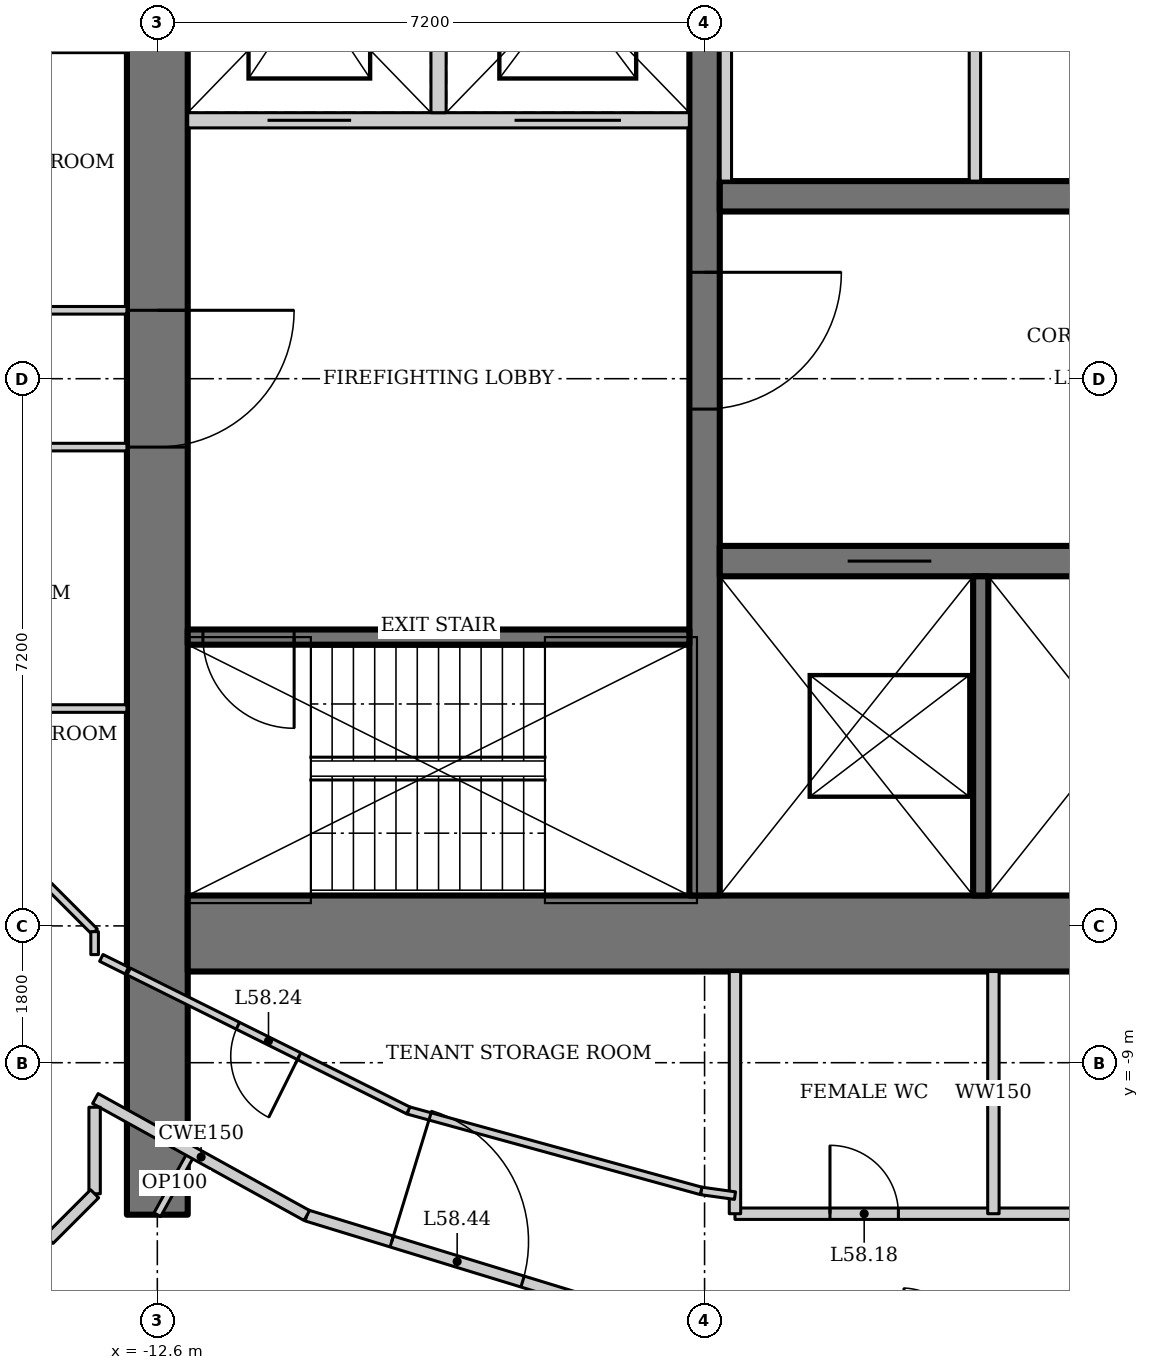
"""IFC4 building model, lengths in metres.
Left out: names, types, materials, properties, quantities, classifications, styles, units other than length and angle.
Written with IfcOpenShell. Run it as: python <this file> out.ifc"""

import sys

from ifc_helpers import new_model, si_unit, direction, frame, frame_2d, origin, place, context, subcontext, project, spatial, rectangle, extrude, element, fill, save


model = new_model("IFC4")
c1 = context("Model", 3, precision=1e-05, world=origin(), true_north=direction((0.0, 1.0)))
c2 = subcontext(c1, "Body", "Model", "MODEL_VIEW")
j1 = project(units=[si_unit("LENGTHUNIT", "METRE"), si_unit("PLANEANGLEUNIT", "RADIAN")], contexts=[c1])
p1 = place(None, origin())
s1 = spatial("IfcSite", under=j1, at=p1, CompositionType="ELEMENT")
p2 = place(p1, origin())
s2 = spatial("IfcBuilding", under=s1, at=p2, CompositionType="ELEMENT")
p3 = place(p2, frame((0.0, 0.0, 249.4)))
s3 = spatial("IfcBuildingStorey", under=s2, at=p3, CompositionType="ELEMENT", Elevation=249.4)
p4 = place(p3, frame((-12.6, 11.0, 0.0), z_axis=(0.0, 0.0, 1.0), x_axis=(0.0, -1.0, 0.0)))
e1 = element("IfcWall", 1, at=p4, inside=s3, PredefinedType="SHEAR", context=c2, shape_type="SweptSolid", body=[
    extrude(rectangle(XDim=22.0, YDim=0.8, at=frame_2d((11.0, 0.0))), origin(), (0.0, 0.0, 1.0), 4.2),
])
p5 = place(p4, frame((10.1, 0.0, 0.0)))
e2 = element("IfcOpeningElement", 2, at=p5, cuts=e1, PredefinedType="OPENING", context=c2, shape_type="SweptSolid", body=[
    extrude(rectangle(XDim=1.8, YDim=2.1, at=frame_2d((0.9, 1.05))), frame((0.0, 0.41, 0.0), z_axis=(0.0, -1.0, 0.0), x_axis=(1.0, 0.0, 0.0)), (0.0, 0.0, 1.0), 0.82),
])
p6 = place(p3, frame((-12.2, -7.3, 0.0), z_axis=(0.0, 0.0, 1.0), x_axis=(1.0, 0.0, 0.0)))
e3 = element("IfcWall", 3, at=p6, inside=s3, PredefinedType="SHEAR", context=c2, shape_type="SweptSolid", body=[
    extrude(rectangle(XDim=24.4, YDim=1.0, at=frame_2d((12.2, 0.0))), origin(), (0.0, 0.0, 1.0), 4.2),
])
p7 = place(p3, frame((-5.4, 7.8, 0.0), z_axis=(0.0, 0.0, 1.0), x_axis=(0.0, -1.0, 0.0)))
e4 = element("IfcWall", 4, at=p7, inside=s3, PredefinedType="SHEAR", context=c2, shape_type="SweptSolid", body=[
    extrude(rectangle(XDim=14.6, YDim=0.4, at=frame_2d((7.3, 0.0))), origin(), (0.0, 0.0, 1.0), 4.2),
])
p8 = place(p7, frame((6.4, 0.0, 0.0)))
e5 = element("IfcOpeningElement", 5, at=p8, cuts=e4, PredefinedType="OPENING", context=c2, shape_type="SweptSolid", body=[
    extrude(rectangle(XDim=1.8, YDim=2.1, at=frame_2d((0.9, 1.05))), frame((0.0, 0.21, 0.0), z_axis=(0.0, -1.0, 0.0), x_axis=(1.0, 0.0, 0.0)), (0.0, 0.0, 1.0), 0.42),
])
p9 = place(p3, frame((-5.2, -2.4, 0.0), z_axis=(0.0, 0.0, 1.0), x_axis=(1.0, 0.0, 0.0)))
e6 = element("IfcWall", 6, at=p9, inside=s3, PredefinedType="SHEAR", context=c2, shape_type="SweptSolid", body=[
    extrude(rectangle(XDim=10.4, YDim=0.4, at=frame_2d((5.2, 0.0))), origin(), (0.0, 0.0, 1.0), 4.2),
])
p10 = place(p9, frame((1.683, 0.0, 0.0)))
e7 = element("IfcOpeningElement", 7, at=p10, cuts=e6, PredefinedType="OPENING", context=c2, shape_type="SweptSolid", body=[
    extrude(rectangle(XDim=1.1, YDim=2.2, at=frame_2d((0.55, 1.1))), frame((0.0, 0.21, 0.0), z_axis=(0.0, -1.0, 0.0), x_axis=(1.0, 0.0, 0.0)), (0.0, 0.0, 1.0), 0.42),
])
p11 = place(p9, frame((5.217, 0.0, 0.0)))
e8 = element("IfcOpeningElement", 8, at=p11, cuts=e6, PredefinedType="OPENING", context=c2, shape_type="SweptSolid", body=[
    extrude(rectangle(XDim=1.1, YDim=2.2, at=frame_2d((0.55, 1.1))), frame((0.0, 0.21, 0.0), z_axis=(0.0, -1.0, 0.0), x_axis=(1.0, 0.0, 0.0)), (0.0, 0.0, 1.0), 0.42),
])
p12 = place(p9, frame((8.75, 0.0, 0.0)))
e9 = element("IfcOpeningElement", 9, at=p12, cuts=e6, PredefinedType="OPENING", context=c2, shape_type="SweptSolid", body=[
    extrude(rectangle(XDim=1.1, YDim=2.2, at=frame_2d((0.55, 1.1))), frame((0.0, 0.21, 0.0), z_axis=(0.0, -1.0, 0.0), x_axis=(1.0, 0.0, 0.0)), (0.0, 0.0, 1.0), 0.42),
])
p13 = place(p3, frame((-1.767, -2.6, 0.0), z_axis=(0.0, 0.0, 1.0), x_axis=(0.0, -1.0, 0.0)))
e10 = element("IfcWall", 10, at=p13, inside=s3, PredefinedType="SOLIDWALL", context=c2, shape_type="SweptSolid", body=[
    extrude(rectangle(XDim=4.2, YDim=0.2, at=frame_2d((2.1, 0.0))), origin(), (0.0, 0.0, 1.0), 4.2),
])
p14 = place(p3, frame((5.2, 2.4, 0.0), z_axis=(0.0, 0.0, 1.0), x_axis=(-1.0, 0.0, 0.0)))
e11 = element("IfcWall", 11, at=p14, inside=s3, PredefinedType="SHEAR", context=c2, shape_type="SweptSolid", body=[
    extrude(rectangle(XDim=10.4, YDim=0.4, at=frame_2d((5.2, 0.0))), origin(), (0.0, 0.0, 1.0), 4.2),
])
p15 = place(p3, frame((-5.6, -3.4, 0.0), z_axis=(0.0, 0.0, 1.0), x_axis=(-1.0, 0.0, 0.0)))
e12 = element("IfcWall", 12, at=p15, inside=s3, PredefinedType="SHEAR", context=c2, shape_type="SweptSolid", body=[
    extrude(rectangle(XDim=6.6, YDim=0.2, at=frame_2d((3.3, 0.0))), origin(), (0.0, 0.0, 1.0), 4.2),
])
p16 = place(p15, frame((5.2, 0.0, 0.0)))
e13 = element("IfcOpeningElement", 13, at=p16, cuts=e12, PredefinedType="OPENING", context=c2, shape_type="SweptSolid", body=[
    extrude(rectangle(XDim=1.2, YDim=2.1, at=frame_2d((0.6, 1.05))), frame((0.0, 0.11, 0.0), z_axis=(0.0, -1.0, 0.0), x_axis=(1.0, 0.0, 0.0)), (0.0, 0.0, 1.0), 0.22),
])
p17 = place(p3, frame((-12.2, 3.4, 0.0), z_axis=(0.0, 0.0, 1.0), x_axis=(1.0, 0.0, 0.0)))
e14 = element("IfcWall", 14, at=p17, inside=s3, PredefinedType="SOLIDWALL", context=c2, shape_type="SweptSolid", body=[
    extrude(rectangle(XDim=6.6, YDim=0.2, at=frame_2d((3.3, 0.0))), origin(), (0.0, 0.0, 1.0), 4.2),
])
p18 = place(p17, frame((1.05, 0.0, 0.0)))
e15 = element("IfcOpeningElement", 15, at=p18, cuts=e14, PredefinedType="OPENING", context=c2, shape_type="SweptSolid", body=[
    extrude(rectangle(XDim=1.1, YDim=2.2, at=frame_2d((0.55, 1.1))), frame((0.0, 0.11, 0.0), z_axis=(0.0, -1.0, 0.0), x_axis=(1.0, 0.0, 0.0)), (0.0, 0.0, 1.0), 0.22),
])
p19 = place(p17, frame((4.3, 0.0, 0.0)))
e16 = element("IfcOpeningElement", 16, at=p19, cuts=e14, PredefinedType="OPENING", context=c2, shape_type="SweptSolid", body=[
    extrude(rectangle(XDim=1.4, YDim=2.2, at=frame_2d((0.7, 1.1))), frame((0.0, 0.11, 0.0), z_axis=(0.0, -1.0, 0.0), x_axis=(1.0, 0.0, 0.0)), (0.0, 0.0, 1.0), 0.22),
])
p20 = place(p3, frame((-8.9, 3.5, 0.0), z_axis=(0.0, 0.0, 1.0), x_axis=(0.0, 1.0, 0.0)))
e17 = element("IfcWall", 17, at=p20, inside=s3, PredefinedType="SOLIDWALL", context=c2, shape_type="SweptSolid", body=[
    extrude(rectangle(XDim=3.3, YDim=0.2, at=frame_2d((1.65, 0.0))), origin(), (0.0, 0.0, 1.0), 4.2),
])
p21 = place(p3, frame((-10.633, -11.01, 0.0), z_axis=(0.0, 0.0, 1.0), x_axis=(0.956185837153, -0.292760388079, 0.0)))
e18 = element("IfcWall", 18, at=p21, inside=s3, PredefinedType="PARTITIONING", context=c2, shape_type="SweptSolid", body=[
    extrude(rectangle(XDim=4.544, YDim=0.15, at=frame_2d((2.272, 0.0))), origin(), (0.0, 0.0, 1.0), 4.05),
])
p22 = place(p21, frame((1.168, 0.0, 0.0)))
e19 = element("IfcOpeningElement", 19, at=p22, cuts=e18, PredefinedType="OPENING", context=c2, shape_type="SweptSolid", body=[
    extrude(rectangle(XDim=1.8, YDim=2.1, at=frame_2d((0.9, 1.05))), frame((0.0, 0.085, 0.0), z_axis=(0.0, -1.0, 0.0), x_axis=(1.0, 0.0, 0.0)), (0.0, 0.0, 1.0), 0.17),
])
for number, where, z_axis, x_axis in (
    (20, (-5.12, 2.6, 0.0), (0.0, 0.0, 1.0), (0.0, 1.0, 0.0)),
    (21, (-1.843, 2.6, 0.0), (0.0, 0.0, 1.0), (0.0, 1.0, 0.0)),
):
    element("IfcWall", number, at=place(p3, frame(where, z_axis=z_axis, x_axis=x_axis)), inside=s3, PredefinedType="SOLIDWALL", context=c2, shape_type="SweptSolid", body=[
        extrude(rectangle(XDim=4.4, YDim=0.15, at=frame_2d((2.2, 0.0))), origin(), (0.0, 0.0, 1.0), 4.05),
    ])
p23 = place(p3, frame((-5.0, -10.987, 0.0), z_axis=(0.0, 0.0, 1.0), x_axis=(1.0, 0.0, 0.0)))
e22 = element("IfcWall", 22, at=p23, inside=s3, PredefinedType="SOLIDWALL", context=c2, shape_type="SweptSolid", body=[
    extrude(rectangle(XDim=10.0, YDim=0.15, at=frame_2d((5.0, 0.0))), origin(), (0.0, 0.0, 1.0), 4.05),
])
p24 = place(p23, frame((1.25, 0.0, 0.0)))
e23 = element("IfcOpeningElement", 23, at=p24, cuts=e22, PredefinedType="OPENING", context=c2, shape_type="SweptSolid", body=[
    extrude(rectangle(XDim=0.9, YDim=2.1, at=frame_2d((0.45, 1.05))), frame((0.0, 0.085, 0.0), z_axis=(0.0, -1.0, 0.0), x_axis=(1.0, 0.0, 0.0)), (0.0, 0.0, 1.0), 0.17),
])
p25 = place(p23, frame((4.65, 0.0, 0.0)))
e24 = element("IfcOpeningElement", 24, at=p25, cuts=e22, PredefinedType="OPENING", context=c2, shape_type="SweptSolid", body=[
    extrude(rectangle(XDim=0.9, YDim=2.1, at=frame_2d((0.45, 1.05))), frame((0.0, 0.085, 0.0), z_axis=(0.0, -1.0, 0.0), x_axis=(1.0, 0.0, 0.0)), (0.0, 0.0, 1.0), 0.17),
])
p26 = place(p23, frame((7.25, 0.0, 0.0)))
e25 = element("IfcOpeningElement", 25, at=p26, cuts=e22, PredefinedType="OPENING", context=c2, shape_type="SweptSolid", body=[
    extrude(rectangle(XDim=1.0, YDim=2.1, at=frame_2d((0.5, 1.05))), frame((0.0, 0.085, 0.0), z_axis=(0.0, -1.0, 0.0), x_axis=(1.0, 0.0, 0.0)), (0.0, 0.0, 1.0), 0.17),
])
p27 = place(p23, frame((8.95, 0.0, 0.0)))
e26 = element("IfcOpeningElement", 26, at=p27, cuts=e22, PredefinedType="OPENING", context=c2, shape_type="SweptSolid", body=[
    extrude(rectangle(XDim=0.8, YDim=2.1, at=frame_2d((0.4, 1.05))), frame((0.0, 0.085, 0.0), z_axis=(0.0, -1.0, 0.0), x_axis=(1.0, 0.0, 0.0)), (0.0, 0.0, 1.0), 0.17),
])
for number, where, z_axis, x_axis in (
    (27, (-5.0, -7.8, 0.0), (0.0, 0.0, 1.0), (0.0, -1.0, 0.0)),
    (28, (-1.6, -7.8, 0.0), (0.0, 0.0, 1.0), (0.0, -1.0, 0.0)),
):
    element("IfcWall", number, at=place(p3, frame(where, z_axis=z_axis, x_axis=x_axis)), inside=s3, PredefinedType="SOLIDWALL", context=c2, shape_type="SweptSolid", body=[
        extrude(rectangle(XDim=3.187, YDim=0.15, at=frame_2d((1.594, 0.0))), origin(), (0.0, 0.0, 1.0), 4.05),
    ])
p28 = place(p3, frame((-16.729, -4.34, 0.0), z_axis=(0.0, 0.0, 1.0), x_axis=(1.0, 0.0, 0.0)))
e29 = element("IfcWall", 29, at=p28, inside=s3, PredefinedType="PARTITIONING", context=c2, shape_type="SweptSolid", body=[
    extrude(rectangle(XDim=3.729, YDim=0.1, at=frame_2d((1.865, 0.0))), origin(), (0.0, 0.0, 1.0), 4.05),
])
p29 = place(p3, frame((-13.0, -7.788, 0.0), z_axis=(0.0, 0.0, 1.0), x_axis=(-0.895721570004, 0.444615416995, 0.0)))
e30 = element("IfcWall", 30, at=p29, inside=s3, PredefinedType="PARTITIONING", context=c2, shape_type="SweptSolid", body=[
    extrude(rectangle(XDim=0.376, YDim=0.1, at=frame_2d((0.188, 0.0))), origin(), (0.0, 0.0, 1.0), 4.05),
])
p30 = place(p3, frame((-5.0, -10.749, 0.0), z_axis=(0.0, 0.0, 1.0), x_axis=(-0.990442882696, 0.137923515463, 0.0)))
e31 = element("IfcWall", 31, at=p30, inside=s3, PredefinedType="PARTITIONING", context=c2, shape_type="SweptSolid", body=[
    extrude(rectangle(XDim=0.45, YDim=0.1, at=frame_2d((0.225, 0.0))), origin(), (0.0, 0.0, 1.0), 4.05),
])
p31 = place(p3, frame((-5.445, -10.687, 0.0), z_axis=(0.0, 0.0, 1.0), x_axis=(-0.964244438722, 0.265014456954, 0.0)))
e32 = element("IfcWall", 32, at=p31, inside=s3, PredefinedType="PARTITIONING", context=c2, shape_type="SweptSolid", body=[
    extrude(rectangle(XDim=3.995, YDim=0.1, at=frame_2d((1.998, 0.0))), origin(), (0.0, 0.0, 1.0), 4.05),
])
p32 = place(p3, frame((-9.298, -9.628, 0.0), z_axis=(0.0, 0.0, 1.0), x_axis=(-0.895529831139, 0.445001484874, 0.0)))
e33 = element("IfcWall", 33, at=p32, inside=s3, PredefinedType="PARTITIONING", context=c2, shape_type="SweptSolid", body=[
    extrude(rectangle(XDim=4.108, YDim=0.1, at=frame_2d((2.054, 0.0))), origin(), (0.0, 0.0, 1.0), 4.05),
])
p33 = place(p32, frame((1.604, 0.0, 0.0)))
e34 = element("IfcOpeningElement", 34, at=p33, cuts=e33, PredefinedType="OPENING", context=c2, shape_type="SweptSolid", body=[
    extrude(rectangle(XDim=0.9, YDim=2.1, at=frame_2d((0.45, 1.05))), frame((0.0, 0.06, 0.0), z_axis=(0.0, -1.0, 0.0), x_axis=(1.0, 0.0, 0.0)), (0.0, 0.0, 1.0), 0.12),
])
p34 = place(p3, frame((-16.729, 4.34, 0.0), z_axis=(0.0, 0.0, 1.0), x_axis=(1.0, 0.0, 0.0)))
e35 = element("IfcWall", 35, at=p34, inside=s3, PredefinedType="PARTITIONING", context=c2, shape_type="SweptSolid", body=[
    extrude(rectangle(XDim=3.729, YDim=0.1, at=frame_2d((1.865, 0.0))), origin(), (0.0, 0.0, 1.0), 4.05),
])
p35 = place(p3, frame((-12.6, -11.0, 0.0), z_axis=(0.0, 0.0, 1.0), x_axis=(0.484103558985, 0.875010710893, 0.0)))
e36 = element("IfcWall", 36, at=p35, inside=s3, PredefinedType="PARTITIONING", context=c2, shape_type="SweptSolid", body=[
    extrude(rectangle(XDim=0.943, YDim=0.1, at=frame_2d((0.472, 0.0))), origin(), (0.0, 0.0, 1.0), 4.05),
])
p36 = place(p3, frame((-15.165, -0.9, 0.0), z_axis=(0.0, 0.0, 1.0), x_axis=(1.0, 0.0, 0.0)))
e37 = element("IfcWall", 37, at=p36, inside=s3, PredefinedType="PARTITIONING", context=c2, shape_type="SweptSolid", body=[
    extrude(rectangle(XDim=2.165, YDim=0.1, at=frame_2d((1.083, 0.0))), origin(), (0.0, 0.0, 1.0), 4.05),
])
p37 = place(p36, frame((0.1, 0.0, 0.0)))
e38 = element("IfcOpeningElement", 38, at=p37, cuts=e37, PredefinedType="OPENING", context=c2, shape_type="SweptSolid", body=[
    extrude(rectangle(XDim=0.9, YDim=2.1, at=frame_2d((0.45, 1.05))), frame((0.0, 0.06, 0.0), z_axis=(0.0, -1.0, 0.0), x_axis=(1.0, 0.0, 0.0)), (0.0, 0.0, 1.0), 0.12),
])
p38 = place(p3, frame((-13.0, 0.9, 0.0), z_axis=(0.0, 0.0, 1.0), x_axis=(-1.0, 0.0, 0.0)))
e39 = element("IfcWall", 39, at=p38, inside=s3, PredefinedType="PARTITIONING", context=c2, shape_type="SweptSolid", body=[
    extrude(rectangle(XDim=2.165, YDim=0.1, at=frame_2d((1.083, 0.0))), origin(), (0.0, 0.0, 1.0), 4.05),
])
p39 = place(p38, frame((1.15, 0.0, 0.0)))
e40 = element("IfcOpeningElement", 40, at=p39, cuts=e39, PredefinedType="OPENING", context=c2, shape_type="SweptSolid", body=[
    extrude(rectangle(XDim=0.9, YDim=2.1, at=frame_2d((0.45, 1.05))), frame((0.0, 0.06, 0.0), z_axis=(0.0, -1.0, 0.0), x_axis=(1.0, 0.0, 0.0)), (0.0, 0.0, 1.0), 0.12),
])
p40 = place(p3, frame((-13.415, -9.472, 0.0), z_axis=(0.0, 0.0, 1.0), x_axis=(0.875072100837, -0.483992580869, 0.0)))
e41 = element("IfcWall", 41, at=p40, inside=s3, PredefinedType="PARTITIONING", context=c2, shape_type="SweptSolid", body=[
    extrude(rectangle(XDim=3.179, YDim=0.15, at=frame_2d((1.59, 0.0))), origin(), (0.0, 0.0, 1.0), 4.05),
])
p41 = place(p3, frame((-14.025, -6.675, 0.0), z_axis=(0.0, 0.0, 1.0), x_axis=(0.707106781187, -0.707106781187, 0.0)))
e42 = element("IfcWall", 42, at=p41, inside=s3, PredefinedType="PARTITIONING", context=c2, shape_type="SweptSolid", body=[
    extrude(rectangle(XDim=0.849, YDim=0.1, at=frame_2d((0.425, 0.0))), origin(), (0.0, 0.0, 1.0), 4.05),
])
p42 = place(p3, frame((-13.425, -7.275, 0.0), z_axis=(0.0, 0.0, 1.0), x_axis=(0.0, -1.0, 0.0)))
e43 = element("IfcWall", 43, at=p42, inside=s3, PredefinedType="PARTITIONING", context=c2, shape_type="SweptSolid", body=[
    extrude(rectangle(XDim=0.302, YDim=0.1, at=frame_2d((0.151, 0.0))), origin(), (0.0, 0.0, 1.0), 4.05),
])
p43 = place(p3, frame((-13.425, -9.586, 0.0), z_axis=(0.0, 0.0, 1.0), x_axis=(0.0, -1.0, 0.0)))
e44 = element("IfcWall", 44, at=p43, inside=s3, PredefinedType="PARTITIONING", context=c2, shape_type="SweptSolid", body=[
    extrude(rectangle(XDim=1.138, YDim=0.15, at=frame_2d((0.569, 0.0))), origin(), (0.0, 0.0, 1.0), 4.05),
])
p44 = place(p3, frame((-13.425, -10.725, 0.0), z_axis=(0.0, 0.0, 1.0), x_axis=(-0.707106781187, -0.707106781187, 0.0)))
e45 = element("IfcWall", 45, at=p44, inside=s3, PredefinedType="PARTITIONING", context=c2, shape_type="SweptSolid", body=[
    extrude(rectangle(XDim=0.849, YDim=0.15, at=frame_2d((0.425, 0.0))), origin(), (0.0, 0.0, 1.0), 4.05),
])
p45 = place(p8, origin())
e46 = element("IfcDoor", 46, at=p45, inside=s3, OperationType="DOUBLE_DOOR_DOUBLE_SWING", PredefinedType="DOOR", context=c2, shape_type="SweptSolid", body=[
    extrude(rectangle(XDim=1.8, YDim=2.1, at=frame_2d((0.9, 1.05))), frame((0.0, 0.025, 0.0), z_axis=(0.0, -1.0, 0.0), x_axis=(1.0, 0.0, 0.0)), (0.0, 0.0, 1.0), 0.05),
])
fill(e5, e46)
p46 = place(p16, origin())
e47 = element("IfcDoor", 47, at=p46, inside=s3, OperationType="SINGLE_SWING_RIGHT", PredefinedType="DOOR", context=c2, shape_type="SweptSolid", body=[
    extrude(rectangle(XDim=1.2, YDim=2.1, at=frame_2d((0.6, 1.05))), frame((0.0, 0.025, 0.0), z_axis=(0.0, -1.0, 0.0), x_axis=(1.0, 0.0, 0.0)), (0.0, 0.0, 1.0), 0.05),
])
fill(e13, e47)
p47 = place(p5, origin())
e48 = element("IfcDoor", 48, at=p47, inside=s3, OperationType="DOUBLE_DOOR_DOUBLE_SWING", PredefinedType="DOOR", context=c2, shape_type="SweptSolid", body=[
    extrude(rectangle(XDim=1.8, YDim=2.1, at=frame_2d((0.9, 1.05))), frame((0.0, 0.025, 0.0), z_axis=(0.0, -1.0, 0.0), x_axis=(1.0, 0.0, 0.0)), (0.0, 0.0, 1.0), 0.05),
])
fill(e2, e48)
p48 = place(p10, origin())
e49 = element("IfcDoor", 49, at=p48, inside=s3, OperationType="DOUBLE_DOOR_SLIDING", PredefinedType="DOOR", context=c2, shape_type="SweptSolid", body=[
    extrude(rectangle(XDim=1.1, YDim=2.2, at=frame_2d((0.55, 1.1))), frame((0.0, 0.025, 0.0), z_axis=(0.0, -1.0, 0.0), x_axis=(1.0, 0.0, 0.0)), (0.0, 0.0, 1.0), 0.05),
])
fill(e7, e49)
p49 = place(p18, origin())
e50 = element("IfcDoor", 50, at=p49, inside=s3, OperationType="DOUBLE_DOOR_SLIDING", PredefinedType="DOOR", context=c2, shape_type="SweptSolid", body=[
    extrude(rectangle(XDim=1.1, YDim=2.2, at=frame_2d((0.55, 1.1))), frame((0.0, 0.025, 0.0), z_axis=(0.0, -1.0, 0.0), x_axis=(1.0, 0.0, 0.0)), (0.0, 0.0, 1.0), 0.05),
])
fill(e15, e50)
p50 = place(p19, origin())
e51 = element("IfcDoor", 51, at=p50, inside=s3, OperationType="DOUBLE_DOOR_SLIDING", PredefinedType="DOOR", context=c2, shape_type="SweptSolid", body=[
    extrude(rectangle(XDim=1.4, YDim=2.2, at=frame_2d((0.7, 1.1))), frame((0.0, 0.025, 0.0), z_axis=(0.0, -1.0, 0.0), x_axis=(1.0, 0.0, 0.0)), (0.0, 0.0, 1.0), 0.05),
])
fill(e16, e51)
p51 = place(p24, origin())
e52 = element("IfcDoor", 52, at=p51, inside=s3, OperationType="SINGLE_SWING_LEFT", PredefinedType="DOOR", context=c2, shape_type="SweptSolid", body=[
    extrude(rectangle(XDim=0.9, YDim=2.1, at=frame_2d((0.45, 1.05))), frame((0.0, 0.025, 0.0), z_axis=(0.0, -1.0, 0.0), x_axis=(1.0, 0.0, 0.0)), (0.0, 0.0, 1.0), 0.05),
])
fill(e23, e52)
p52 = place(p33, origin())
e53 = element("IfcDoor", 53, at=p52, inside=s3, OperationType="SINGLE_SWING_LEFT", PredefinedType="DOOR", context=c2, shape_type="SweptSolid", body=[
    extrude(rectangle(XDim=0.9, YDim=2.1, at=frame_2d((0.45, 1.05))), frame((0.0, 0.025, 0.0), z_axis=(0.0, -1.0, 0.0), x_axis=(1.0, 0.0, 0.0)), (0.0, 0.0, 1.0), 0.05),
])
fill(e34, e53)
p53 = place(p22, origin())
e54 = element("IfcDoor", 54, at=p53, inside=s3, OperationType="DOUBLE_DOOR_DOUBLE_SWING", PredefinedType="DOOR", context=c2, shape_type="SweptSolid", body=[
    extrude(rectangle(XDim=1.8, YDim=2.1, at=frame_2d((0.9, 1.05))), frame((0.0, 0.025, 0.0), z_axis=(0.0, -1.0, 0.0), x_axis=(1.0, 0.0, 0.0)), (0.0, 0.0, 1.0), 0.05),
])
fill(e19, e54)
save(model, sys.argv[1])
